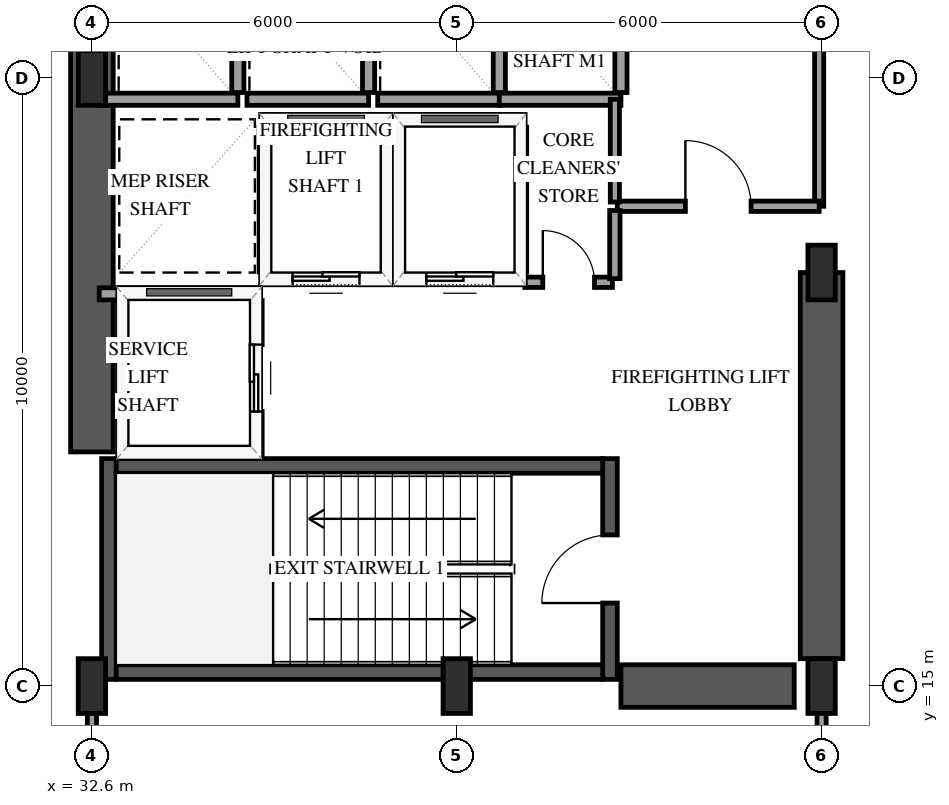
"""IFC4 building model, lengths in metres.
Left out: names, types, materials, properties, quantities, classifications, styles, units other than length and angle.
Written with IfcOpenShell. Run it as: python <this file> out.ifc"""

import sys

from ifc_helpers import new_model, si_unit, direction, frame, frame_2d, origin, origin_2d, place, context, subcontext, project, spatial, rectangle, extrude, element, fill, save


model = new_model("IFC4")
c1 = context("Model", 3, precision=1e-05, world=origin(), true_north=direction((0.0, 1.0)))
c2 = subcontext(c1, "Body", "Model", "MODEL_VIEW")
j1 = project(units=[si_unit("LENGTHUNIT", "METRE"), si_unit("PLANEANGLEUNIT", "RADIAN")], contexts=[c1])
p1 = place(None, origin())
s1 = spatial("IfcSite", under=j1, at=p1, CompositionType="ELEMENT")
p2 = place(p1, origin())
s2 = spatial("IfcBuilding", under=s1, at=p2, CompositionType="ELEMENT")
p3 = place(p2, frame((0.0, 0.0, 6.0)))
s3 = spatial("IfcBuildingStorey", under=s2, at=p3, CompositionType="ELEMENT", Elevation=6.0)
p4 = place(p3, frame((32.88, 15.11, 0.0), z_axis=(0.0, 0.0, 1.0), x_axis=(0.0, 1.0, 0.0)))
e1 = element("IfcWall", 1, at=p4, inside=s3, PredefinedType="SHEAR", context=c2, shape_type="SweptSolid", body=[
    extrude(rectangle(XDim=3.63, YDim=0.24, at=frame_2d((1.815, 0.0))), origin(), (0.0, 0.0, 1.0), 5.4),
])
p5 = place(p3, frame((41.12, 15.11, 0.0), z_axis=(0.0, 0.0, 1.0), x_axis=(0.0, 1.0, 0.0)))
e2 = element("IfcWall", 2, at=p5, inside=s3, PredefinedType="SHEAR", context=c2, shape_type="SweptSolid", body=[
    extrude(rectangle(XDim=3.63, YDim=0.24, at=frame_2d((1.815, 0.0))), origin(), (0.0, 0.0, 1.0), 5.4),
])
p6 = place(p5, frame((1.255, 0.0, 0.0)))
e3 = element("IfcOpeningElement", 3, at=p6, cuts=e2, PredefinedType="OPENING", context=c2, shape_type="SweptSolid", body=[
    extrude(rectangle(XDim=1.12, YDim=2.15, at=frame_2d((0.56, 1.075))), frame((0.0, 0.13, 0.0), z_axis=(0.0, -1.0, 0.0), x_axis=(1.0, 0.0, 0.0)), (0.0, 0.0, 1.0), 0.26),
])
for number, where, z_axis, x_axis in (
    (4, (33.0, 15.23, 0.0), (0.0, 0.0, 1.0), (1.0, 0.0, 0.0)),
    (5, (33.0, 18.62, 0.0), (0.0, 0.0, 1.0), (1.0, 0.0, 0.0)),
):
    element("IfcWall", number, at=place(p3, frame(where, z_axis=z_axis, x_axis=x_axis)), inside=s3, PredefinedType="SHEAR", context=c2, shape_type="SweptSolid", body=[
        extrude(rectangle(XDim=8.0, YDim=0.24, at=frame_2d((4.0, 0.0))), origin(), (0.0, 0.0, 1.0), 5.4),
    ])
p7 = place(p3, frame((32.6, 18.85, 0.0), z_axis=(0.0, 0.0, 1.0), x_axis=(0.0, 1.0, 0.0)))
e6 = element("IfcWall", 6, at=p7, inside=s3, PredefinedType="SHEAR", context=c2, shape_type="SweptSolid", body=[
    extrude(rectangle(XDim=12.3, YDim=0.7, at=frame_2d((6.15, 0.0))), origin(), (0.0, 0.0, 1.0), 5.4),
])
p8 = place(p3, frame((41.3, 15.0, 0.0), z_axis=(0.0, 0.0, 1.0), x_axis=(1.0, 0.0, 0.0)))
e7 = element("IfcWall", 7, at=p8, inside=s3, PredefinedType="SHEAR", context=c2, shape_type="SweptSolid", body=[
    extrude(rectangle(XDim=2.85, YDim=0.7, at=frame_2d((1.425, 0.0))), origin(), (0.0, 0.0, 1.0), 5.4),
])
p9 = place(p3, frame((44.6, 15.45, 0.0), z_axis=(0.0, 0.0, 1.0), x_axis=(0.0, 1.0, 0.0)))
e8 = element("IfcWall", 8, at=p9, inside=s3, PredefinedType="SHEAR", context=c2, shape_type="SweptSolid", body=[
    extrude(rectangle(XDim=6.35, YDim=0.7, at=frame_2d((3.175, 0.0))), origin(), (0.0, 0.0, 1.0), 5.4),
])
for number, where, z_axis, x_axis in (
    (9, (32.6, 15.0, 0.0), (0.0, 0.0, 1.0), (1.0, 0.0, 0.0)),
    (10, (32.6, 25.0, 0.0), (0.0, 0.0, 1.0), (1.0, 0.0, 0.0)),
    (11, (38.6, 15.0, 0.0), (0.0, 0.0, 1.0), (1.0, 0.0, 0.0)),
    (12, (44.6, 15.0, 0.0), (0.0, 0.0, 1.0), (1.0, 0.0, 0.0)),
    (13, (44.6, 21.8, 0.0), (0.0, 0.0, 1.0), (1.0, 0.0, 0.0)),
):
    element("IfcColumn", number, at=place(p3, frame(where, z_axis=z_axis, x_axis=x_axis)), inside=s3, PredefinedType="PILASTER", context=c2, shape_type="SweptSolid", body=[
        extrude(rectangle(XDim=0.45, YDim=0.9, at=origin_2d()), origin(), (0.0, 0.0, 1.0), 5.4),
    ])
p10 = place(p3, frame((35.45, 21.7, 0.0), z_axis=(0.0, 0.0, 1.0), x_axis=(1.0, 0.0, 0.0)))
e14 = element("IfcWall", 14, at=p10, inside=s3, PredefinedType="SOLIDWALL", context=c2, shape_type="SweptSolid", body=[
    extrude(rectangle(XDim=2.0, YDim=0.2, at=frame_2d((1.0, 0.0))), origin(), (0.0, 0.0, 1.0), 5.08),
])
p11 = place(p10, frame((0.45, 0.0, 0.0)))
e15 = element("IfcOpeningElement", 15, at=p11, cuts=e14, PredefinedType="OPENING", context=c2, shape_type="SweptSolid", body=[
    extrude(rectangle(XDim=1.1, YDim=2.15, at=frame_2d((0.55, 1.075))), frame((0.0, 0.11, 0.0), z_axis=(0.0, -1.0, 0.0), x_axis=(1.0, 0.0, 0.0)), (0.0, 0.0, 1.0), 0.22),
])
p12 = place(p3, frame((35.45, 24.3, 0.0), z_axis=(0.0, 0.0, 1.0), x_axis=(1.0, 0.0, 0.0)))
e16 = element("IfcWall", 16, at=p12, inside=s3, PredefinedType="SOLIDWALL", context=c2, shape_type="SweptSolid", body=[
    extrude(rectangle(XDim=2.0, YDim=0.2, at=frame_2d((1.0, 0.0))), origin(), (0.0, 0.0, 1.0), 5.08),
])
for number, where, z_axis, x_axis in (
    (17, (35.45, 21.81, 0.0), (0.0, 0.0, 1.0), (0.0, 1.0, 0.0)),
    (18, (37.45, 21.81, 0.0), (0.0, 0.0, 1.0), (0.0, 1.0, 0.0)),
):
    element("IfcWall", number, at=place(p3, frame(where, z_axis=z_axis, x_axis=x_axis)), inside=s3, PredefinedType="SOLIDWALL", context=c2, shape_type="SweptSolid", body=[
        extrude(rectangle(XDim=2.38, YDim=0.2, at=frame_2d((1.19, 0.0))), origin(), (0.0, 0.0, 1.0), 5.08),
    ])
p13 = place(p3, frame((37.65, 21.7, 0.0), z_axis=(0.0, 0.0, 1.0), x_axis=(1.0, 0.0, 0.0)))
e19 = element("IfcWall", 19, at=p13, inside=s3, PredefinedType="SOLIDWALL", context=c2, shape_type="SweptSolid", body=[
    extrude(rectangle(XDim=2.0, YDim=0.2, at=frame_2d((1.0, 0.0))), origin(), (0.0, 0.0, 1.0), 5.08),
])
p14 = place(p13, frame((0.45, 0.0, 0.0)))
e20 = element("IfcOpeningElement", 20, at=p14, cuts=e19, PredefinedType="OPENING", context=c2, shape_type="SweptSolid", body=[
    extrude(rectangle(XDim=1.1, YDim=2.15, at=frame_2d((0.55, 1.075))), frame((0.0, 0.11, 0.0), z_axis=(0.0, -1.0, 0.0), x_axis=(1.0, 0.0, 0.0)), (0.0, 0.0, 1.0), 0.22),
])
p15 = place(p3, frame((37.65, 24.3, 0.0), z_axis=(0.0, 0.0, 1.0), x_axis=(1.0, 0.0, 0.0)))
e21 = element("IfcWall", 21, at=p15, inside=s3, PredefinedType="SOLIDWALL", context=c2, shape_type="SweptSolid", body=[
    extrude(rectangle(XDim=2.0, YDim=0.2, at=frame_2d((1.0, 0.0))), origin(), (0.0, 0.0, 1.0), 5.08),
])
p16 = place(p3, frame((39.65, 21.81, 0.0), z_axis=(0.0, 0.0, 1.0), x_axis=(0.0, 1.0, 0.0)))
e22 = element("IfcWall", 22, at=p16, inside=s3, PredefinedType="SOLIDWALL", context=c2, shape_type="SweptSolid", body=[
    extrude(rectangle(XDim=2.38, YDim=0.2, at=frame_2d((1.19, 0.0))), origin(), (0.0, 0.0, 1.0), 5.08),
])
p17 = place(p3, frame((32.72, 21.45, 0.0), z_axis=(0.0, 0.0, 1.0), x_axis=(1.0, 0.0, 0.0)))
e23 = element("IfcWall", 23, at=p17, inside=s3, PredefinedType="SOLIDWALL", context=c2, shape_type="SweptSolid", body=[
    extrude(rectangle(XDim=2.58, YDim=0.2, at=frame_2d((1.29, 0.0))), origin(), (0.0, 0.0, 1.0), 5.08),
])
p18 = place(p3, frame((35.3, 18.79, 0.0), z_axis=(0.0, 0.0, 1.0), x_axis=(0.0, 1.0, 0.0)))
e24 = element("IfcWall", 24, at=p18, inside=s3, PredefinedType="SOLIDWALL", context=c2, shape_type="SweptSolid", body=[
    extrude(rectangle(XDim=2.55, YDim=0.2, at=frame_2d((1.275, 0.0))), origin(), (0.0, 0.0, 1.0), 5.08),
])
p19 = place(p18, frame((0.725, 0.0, 0.0)))
e25 = element("IfcOpeningElement", 25, at=p19, cuts=e24, PredefinedType="OPENING", context=c2, shape_type="SweptSolid", body=[
    extrude(rectangle(XDim=1.1, YDim=2.15, at=frame_2d((0.55, 1.075))), frame((0.0, 0.11, 0.0), z_axis=(0.0, -1.0, 0.0), x_axis=(1.0, 0.0, 0.0)), (0.0, 0.0, 1.0), 0.22),
])
p20 = place(p3, frame((32.72, 24.65, 0.0), z_axis=(0.0, 0.0, 1.0), x_axis=(1.0, 0.0, 0.0)))
e26 = element("IfcWall", 26, at=p20, inside=s3, PredefinedType="SOLIDWALL", context=c2, shape_type="SweptSolid", body=[
    extrude(rectangle(XDim=2.28, YDim=0.2, at=frame_2d((1.14, 0.0))), origin(), (0.0, 0.0, 1.0), 5.08),
])
p21 = place(p3, frame((35.0, 24.76, 0.0), z_axis=(0.0, 0.0, 1.0), x_axis=(0.0, 1.0, 0.0)))
e27 = element("IfcWall", 27, at=p21, inside=s3, PredefinedType="SOLIDWALL", context=c2, shape_type="SweptSolid", body=[
    extrude(rectangle(XDim=2.08, YDim=0.2, at=frame_2d((1.04, 0.0))), origin(), (0.0, 0.0, 1.0), 5.08),
])
p22 = place(p3, frame((35.15, 24.65, 0.0), z_axis=(0.0, 0.0, 1.0), x_axis=(1.0, 0.0, 0.0)))
e28 = element("IfcWall", 28, at=p22, inside=s3, PredefinedType="SOLIDWALL", context=c2, shape_type="SweptSolid", body=[
    extrude(rectangle(XDim=2.0, YDim=0.2, at=frame_2d((1.0, 0.0))), origin(), (0.0, 0.0, 1.0), 5.08),
])
p23 = place(p3, frame((37.15, 24.76, 0.0), z_axis=(0.0, 0.0, 1.0), x_axis=(0.0, 1.0, 0.0)))
e29 = element("IfcWall", 29, at=p23, inside=s3, PredefinedType="SOLIDWALL", context=c2, shape_type="SweptSolid", body=[
    extrude(rectangle(XDim=2.08, YDim=0.2, at=frame_2d((1.04, 0.0))), origin(), (0.0, 0.0, 1.0), 5.08),
])
p24 = place(p3, frame((37.3, 24.65, 0.0), z_axis=(0.0, 0.0, 1.0), x_axis=(1.0, 0.0, 0.0)))
e30 = element("IfcWall", 30, at=p24, inside=s3, PredefinedType="SOLIDWALL", context=c2, shape_type="SweptSolid", body=[
    extrude(rectangle(XDim=2.0, YDim=0.2, at=frame_2d((1.0, 0.0))), origin(), (0.0, 0.0, 1.0), 5.08),
])
p25 = place(p3, frame((39.3, 24.76, 0.0), z_axis=(0.0, 0.0, 1.0), x_axis=(0.0, 1.0, 0.0)))
e31 = element("IfcWall", 31, at=p25, inside=s3, PredefinedType="SOLIDWALL", context=c2, shape_type="SweptSolid", body=[
    extrude(rectangle(XDim=2.08, YDim=0.2, at=frame_2d((1.04, 0.0))), origin(), (0.0, 0.0, 1.0), 5.08),
])
p26 = place(p3, frame((39.3, 24.65, 0.0), z_axis=(0.0, 0.0, 1.0), x_axis=(1.0, 0.0, 0.0)))
e32 = element("IfcWall", 32, at=p26, inside=s3, PredefinedType="SOLIDWALL", context=c2, shape_type="SweptSolid", body=[
    extrude(rectangle(XDim=2.0, YDim=0.2, at=frame_2d((1.0, 0.0))), origin(), (0.0, 0.0, 1.0), 5.08),
])
p27 = place(p3, frame((41.3, 24.76, 0.0), z_axis=(0.0, 0.0, 1.0), x_axis=(0.0, 1.0, 0.0)))
e33 = element("IfcWall", 33, at=p27, inside=s3, PredefinedType="SOLIDWALL", context=c2, shape_type="SweptSolid", body=[
    extrude(rectangle(XDim=2.08, YDim=0.2, at=frame_2d((1.04, 0.0))), origin(), (0.0, 0.0, 1.0), 5.08),
])
p28 = place(p3, frame((32.6, 14.93, 0.0), z_axis=(0.0, 0.0, 1.0), x_axis=(0.0, -1.0, 0.0)))
e34 = element("IfcWall", 34, at=p28, inside=s3, PredefinedType="PARTITIONING", context=c2, shape_type="SweptSolid", body=[
    extrude(rectangle(XDim=7.86, YDim=0.15, at=frame_2d((3.93, 0.0))), origin(), (0.0, 0.0, 1.0), 4.202),
])
p29 = place(p3, frame((44.56, 29.8, 0.0), z_axis=(0.0, 0.0, 1.0), x_axis=(0.0, -1.0, 0.0)))
e35 = element("IfcWall", 35, at=p29, inside=s3, PredefinedType="PARTITIONING", context=c2, shape_type="SweptSolid", body=[
    extrude(rectangle(XDim=6.91, YDim=0.15, at=frame_2d((3.455, 0.0))), origin(), (0.0, 0.0, 1.0), 4.12),
])
p30 = place(p29, frame((2.915, 0.0, 0.0)))
e36 = element("IfcOpeningElement", 36, at=p30, cuts=e35, PredefinedType="OPENING", context=c2, shape_type="SweptSolid", body=[
    extrude(rectangle(XDim=1.38, YDim=2.2, at=frame_2d((0.69, 1.1))), frame((0.0, 0.085, 0.0), z_axis=(0.0, -1.0, 0.0), x_axis=(1.0, 0.0, 0.0)), (0.0, 0.0, 1.0), 0.17),
])
p31 = place(p3, frame((41.24, 22.89, 0.0), z_axis=(0.0, 0.0, 1.0), x_axis=(1.0, 0.0, 0.0)))
e37 = element("IfcWall", 37, at=p31, inside=s3, PredefinedType="PARTITIONING", context=c2, shape_type="SweptSolid", body=[
    extrude(rectangle(XDim=3.32, YDim=0.17, at=frame_2d((1.66, 0.0))), origin(), (0.0, 0.0, 1.0), 5.08),
])
p32 = place(p31, frame((1.12, 0.0, 0.0)))
e38 = element("IfcOpeningElement", 38, at=p32, cuts=e37, PredefinedType="OPENING", context=c2, shape_type="SweptSolid", body=[
    extrude(rectangle(XDim=1.08, YDim=2.15, at=frame_2d((0.54, 1.075))), frame((0.0, 0.095, 0.0), z_axis=(0.0, -1.0, 0.0), x_axis=(1.0, 0.0, 0.0)), (0.0, 0.0, 1.0), 0.19),
])
p33 = place(p3, frame((44.6, 11.87, 0.0), z_axis=(0.0, 0.0, 1.0), x_axis=(0.0, 1.0, 0.0)))
e39 = element("IfcWall", 39, at=p33, inside=s3, PredefinedType="PARTITIONING", context=c2, shape_type="SweptSolid", body=[
    extrude(rectangle(XDim=3.06, YDim=0.15, at=frame_2d((1.53, 0.0))), origin(), (0.0, 0.0, 1.0), 4.202),
])
p34 = place(p3, frame((41.2, 22.96, 0.0), z_axis=(0.0, 0.0, 1.0), x_axis=(0.0, 1.0, 0.0)))
e40 = element("IfcWall", 40, at=p34, inside=s3, PredefinedType="PARTITIONING", context=c2, shape_type="SweptSolid", body=[
    extrude(rectangle(XDim=1.69, YDim=0.15, at=frame_2d((0.845, 0.0))), origin(), (0.0, 0.0, 1.0), 5.08),
])
p35 = place(p3, frame((39.72, 21.64, 0.0), z_axis=(0.0, 0.0, 1.0), x_axis=(1.0, 0.0, 0.0)))
e41 = element("IfcWall", 41, at=p35, inside=s3, PredefinedType="PARTITIONING", context=c2, shape_type="SweptSolid", body=[
    extrude(rectangle(XDim=1.44, YDim=0.17, at=frame_2d((0.72, 0.0))), origin(), (0.0, 0.0, 1.0), 5.08),
])
p36 = place(p35, frame((0.295, 0.0, 0.0)))
e42 = element("IfcOpeningElement", 42, at=p36, cuts=e41, PredefinedType="OPENING", context=c2, shape_type="SweptSolid", body=[
    extrude(rectangle(XDim=0.85, YDim=2.1, at=frame_2d((0.425, 1.05))), frame((0.0, 0.095, 0.0), z_axis=(0.0, -1.0, 0.0), x_axis=(1.0, 0.0, 0.0)), (0.0, 0.0, 1.0), 0.19),
])
p37 = place(p3, frame((41.2, 21.7, 0.0), z_axis=(0.0, 0.0, 1.0), x_axis=(0.0, 1.0, 0.0)))
e43 = element("IfcWall", 43, at=p37, inside=s3, PredefinedType="PARTITIONING", context=c2, shape_type="SweptSolid", body=[
    extrude(rectangle(XDim=1.12, YDim=0.17, at=frame_2d((0.56, 0.0))), origin(), (0.0, 0.0, 1.0), 5.08),
])
p38 = place(p11, origin())
e44 = element("IfcDoor", 44, at=p38, inside=s3, OperationType="SLIDING_TO_LEFT", PredefinedType="DOOR", context=c2, shape_type="SweptSolid", body=[
    extrude(rectangle(XDim=1.1, YDim=2.15, at=frame_2d((0.55, 1.075))), frame((0.0, 0.025, 0.0), z_axis=(0.0, -1.0, 0.0), x_axis=(1.0, 0.0, 0.0)), (0.0, 0.0, 1.0), 0.05),
])
fill(e15, e44)
p39 = place(p14, origin())
e45 = element("IfcDoor", 45, at=p39, inside=s3, OperationType="SLIDING_TO_LEFT", PredefinedType="DOOR", context=c2, shape_type="SweptSolid", body=[
    extrude(rectangle(XDim=1.1, YDim=2.15, at=frame_2d((0.55, 1.075))), frame((0.0, 0.025, 0.0), z_axis=(0.0, -1.0, 0.0), x_axis=(1.0, 0.0, 0.0)), (0.0, 0.0, 1.0), 0.05),
])
fill(e20, e45)
p40 = place(p19, origin())
e46 = element("IfcDoor", 46, at=p40, inside=s3, OperationType="SLIDING_TO_LEFT", PredefinedType="DOOR", context=c2, shape_type="SweptSolid", body=[
    extrude(rectangle(XDim=1.1, YDim=2.15, at=frame_2d((0.55, 1.075))), frame((0.0, 0.025, 0.0), z_axis=(0.0, -1.0, 0.0), x_axis=(1.0, 0.0, 0.0)), (0.0, 0.0, 1.0), 0.05),
])
fill(e25, e46)
p41 = place(p6, origin())
e47 = element("IfcDoor", 47, at=p41, inside=s3, OperationType="SINGLE_SWING_LEFT", PredefinedType="DOOR", context=c2, shape_type="SweptSolid", body=[
    extrude(rectangle(XDim=1.12, YDim=2.15, at=frame_2d((0.56, 1.075))), frame((0.0, 0.025, 0.0), z_axis=(0.0, -1.0, 0.0), x_axis=(1.0, 0.0, 0.0)), (0.0, 0.0, 1.0), 0.05),
])
fill(e3, e47)
p42 = place(p32, origin())
e48 = element("IfcDoor", 48, at=p42, inside=s3, OperationType="SINGLE_SWING_LEFT", PredefinedType="DOOR", context=c2, shape_type="SweptSolid", body=[
    extrude(rectangle(XDim=1.08, YDim=2.15, at=frame_2d((0.54, 1.075))), frame((0.0, 0.025, 0.0), z_axis=(0.0, -1.0, 0.0), x_axis=(1.0, 0.0, 0.0)), (0.0, 0.0, 1.0), 0.05),
])
fill(e38, e48)
p43 = place(p36, origin())
e49 = element("IfcDoor", 49, at=p43, inside=s3, OperationType="SINGLE_SWING_LEFT", PredefinedType="DOOR", context=c2, shape_type="SweptSolid", body=[
    extrude(rectangle(XDim=0.85, YDim=2.1, at=frame_2d((0.425, 1.05))), frame((0.0, 0.025, 0.0), z_axis=(0.0, -1.0, 0.0), x_axis=(1.0, 0.0, 0.0)), (0.0, 0.0, 1.0), 0.05),
])
fill(e42, e49)
save(model, sys.argv[1])
